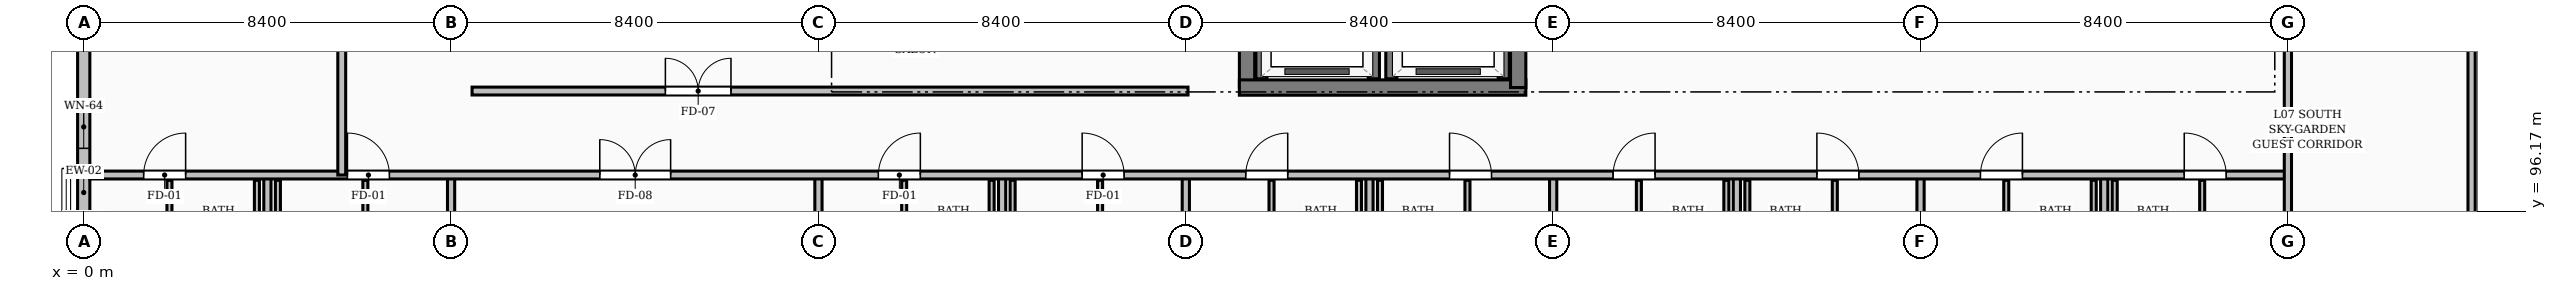
"""IFC4 building model, lengths in metres.
Left out: names, types, materials, properties, quantities, classifications, styles, units other than length and angle.
Written with IfcOpenShell. Run it as: python <this file> out.ifc"""

import sys

from ifc_helpers import new_model, si_unit, direction, frame, frame_2d, origin, place, context, subcontext, project, spatial, rectangle, extrude, element, fill, save


model = new_model("IFC4")
c1 = context("Model", 3, precision=1e-05, world=origin(), true_north=direction((0.0, 1.0)))
c2 = subcontext(c1, "Body", "Model", "MODEL_VIEW")
j1 = project(units=[si_unit("LENGTHUNIT", "METRE"), si_unit("PLANEANGLEUNIT", "RADIAN")], contexts=[c1])
p1 = place(None, origin())
s1 = spatial("IfcSite", under=j1, at=p1, CompositionType="ELEMENT")
p2 = place(p1, origin())
s2 = spatial("IfcBuilding", under=s1, at=p2, CompositionType="ELEMENT")
p3 = place(p2, frame((0.0, 0.0, 25.2)))
s3 = spatial("IfcBuildingStorey", under=s2, at=p3, CompositionType="ELEMENT", Elevation=25.2)
p4 = place(p3, frame((26.6, 99.0, 0.0), z_axis=(0.0, 0.0, 1.0), x_axis=(0.0, 1.0, 0.0)))
e1 = element("IfcWall", 1, at=p4, inside=s3, PredefinedType="SHEAR", context=c2, shape_type="SweptSolid", body=[
    extrude(rectangle(XDim=6.15, YDim=0.35, at=frame_2d((3.075, 0.0))), origin(), (0.0, 0.0, 1.0), 3.12),
])
p5 = place(p3, frame((26.425, 99.0, 0.0), z_axis=(0.0, 0.0, 1.0), x_axis=(1.0, 0.0, 0.0)))
e2 = element("IfcWall", 2, at=p5, inside=s3, PredefinedType="SHEAR", context=c2, shape_type="SweptSolid", body=[
    extrude(rectangle(XDim=6.55, YDim=0.35, at=frame_2d((3.275, 0.0))), origin(), (0.0, 0.0, 1.0), 3.12),
])
p6 = place(p3, frame((32.8, 99.0, 0.0), z_axis=(0.0, 0.0, 1.0), x_axis=(0.0, 1.0, 0.0)))
e3 = element("IfcWall", 3, at=p6, inside=s3, PredefinedType="SHEAR", context=c2, shape_type="SweptSolid", body=[
    extrude(rectangle(XDim=6.15, YDim=0.35, at=frame_2d((3.075, 0.0))), origin(), (0.0, 0.0, 1.0), 3.12),
])
p7 = place(p3, frame((0.0, 92.751, 0.0), z_axis=(0.0, 0.0, 1.0), x_axis=(0.0, 1.0, 0.0)))
e4 = element("IfcWall", 4, at=p7, inside=s3, PredefinedType="SOLIDWALL", context=c2, shape_type="SweptSolid", body=[
    extrude(rectangle(XDim=7.698, YDim=0.28, at=frame_2d((3.849, 0.0))), origin(), (0.0, 0.0, 1.0), 2.414),
])
p8 = place(p7, frame((2.309, 0.0, 0.3)))
e5 = element("IfcOpeningElement", 5, at=p8, cuts=e4, PredefinedType="OPENING", context=c2, shape_type="SweptSolid", body=[
    extrude(rectangle(XDim=0.98, YDim=1.75, at=frame_2d((0.49, 0.875))), frame((0.0, 0.15, 0.0), z_axis=(0.0, -1.0, 0.0), x_axis=(1.0, 0.0, 0.0)), (0.0, 0.0, 1.0), 0.3),
])
p9 = place(p7, frame((4.859, 0.0, 0.3)))
e6 = element("IfcOpeningElement", 6, at=p9, cuts=e4, PredefinedType="OPENING", context=c2, shape_type="SweptSolid", body=[
    extrude(rectangle(XDim=0.98, YDim=1.75, at=frame_2d((0.49, 0.875))), frame((0.0, 0.15, 0.0), z_axis=(0.0, -1.0, 0.0), x_axis=(1.0, 0.0, 0.0)), (0.0, 0.0, 1.0), 0.3),
])
for number, where, z_axis, x_axis in (
    (7, (26.93, 99.2, 0.0), (0.0, 0.0, 1.0), (0.0, 1.0, 0.0)),
    (8, (29.5, 99.2, 0.0), (0.0, 0.0, 1.0), (0.0, 1.0, 0.0)),
    (9, (29.9, 99.2, 0.0), (0.0, 0.0, 1.0), (0.0, 1.0, 0.0)),
    (10, (32.47, 99.2, 0.0), (0.0, 0.0, 1.0), (0.0, 1.0, 0.0)),
):
    element("IfcWall", number, at=place(p3, frame(where, z_axis=z_axis, x_axis=x_axis)), inside=s3, PredefinedType="SOLIDWALL", context=c2, shape_type="SweptSolid", body=[
        extrude(rectangle(XDim=2.2, YDim=0.255, at=frame_2d((1.1, 0.0))), origin(), (0.0, 0.0, 1.0), 3.12),
    ])
for number, where, z_axis, x_axis in (
    (11, (1.96, 94.73, 0.0), (0.0, 0.0, 1.0), (0.0, 1.0, 0.0)),
    (12, (3.96, 94.73, 0.0), (0.0, 0.0, 1.0), (0.0, 1.0, 0.0)),
    (13, (4.44, 94.73, 0.0), (0.0, 0.0, 1.0), (0.0, 1.0, 0.0)),
    (14, (6.44, 94.73, 0.0), (0.0, 0.0, 1.0), (0.0, 1.0, 0.0)),
):
    element("IfcWall", number, at=place(p3, frame(where, z_axis=z_axis, x_axis=x_axis)), inside=s3, PredefinedType="PARTITIONING", context=c2, shape_type="SweptSolid", body=[
        extrude(rectangle(XDim=2.15, YDim=0.115, at=frame_2d((1.075, 0.0))), origin(), (0.0, 0.0, 1.0), 3.12),
    ])
p10 = place(p3, frame((4.2, 92.54, 0.0), z_axis=(0.0, 0.0, 1.0), x_axis=(0.0, 1.0, 0.0)))
e15 = element("IfcWall", 15, at=p10, inside=s3, PredefinedType="PARTITIONING", context=c2, shape_type="SweptSolid", body=[
    extrude(rectangle(XDim=4.46, YDim=0.165, at=frame_2d((2.23, 0.0))), origin(), (0.0, 0.0, 1.0), 3.12),
])
p11 = place(p3, frame((8.4, 92.75, 0.0), z_axis=(0.0, 0.0, 1.0), x_axis=(0.0, 1.0, 0.0)))
e16 = element("IfcWall", 16, at=p11, inside=s3, PredefinedType="PARTITIONING", context=c2, shape_type="SweptSolid", body=[
    extrude(rectangle(XDim=4.25, YDim=0.165, at=frame_2d((2.125, 0.0))), origin(), (0.0, 0.0, 1.0), 2.375),
])
for number, where, z_axis, x_axis in (
    (17, (18.76, 94.73, 0.0), (0.0, 0.0, 1.0), (0.0, 1.0, 0.0)),
    (18, (20.76, 94.73, 0.0), (0.0, 0.0, 1.0), (0.0, 1.0, 0.0)),
    (19, (21.24, 94.73, 0.0), (0.0, 0.0, 1.0), (0.0, 1.0, 0.0)),
    (20, (23.24, 94.73, 0.0), (0.0, 0.0, 1.0), (0.0, 1.0, 0.0)),
):
    element("IfcWall", number, at=place(p3, frame(where, z_axis=z_axis, x_axis=x_axis)), inside=s3, PredefinedType="PARTITIONING", context=c2, shape_type="SweptSolid", body=[
        extrude(rectangle(XDim=2.15, YDim=0.115, at=frame_2d((1.075, 0.0))), origin(), (0.0, 0.0, 1.0), 3.12),
    ])
p12 = place(p3, frame((21.0, 92.562, 0.0), z_axis=(0.0, 0.0, 1.0), x_axis=(0.0, 1.0, 0.0)))
e21 = element("IfcWall", 21, at=p12, inside=s3, PredefinedType="PARTITIONING", context=c2, shape_type="SweptSolid", body=[
    extrude(rectangle(XDim=4.438, YDim=0.165, at=frame_2d((2.219, 0.0))), origin(), (0.0, 0.0, 1.0), 3.12),
])
p13 = place(p3, frame((16.8, 92.75, 0.0), z_axis=(0.0, 0.0, 1.0), x_axis=(0.0, 1.0, 0.0)))
e22 = element("IfcWall", 22, at=p13, inside=s3, PredefinedType="PARTITIONING", context=c2, shape_type="SweptSolid", body=[
    extrude(rectangle(XDim=4.25, YDim=0.165, at=frame_2d((2.125, 0.0))), origin(), (0.0, 0.0, 1.0), 2.455),
])
p14 = place(p3, frame((27.16, 94.73, 0.0), z_axis=(0.0, 0.0, 1.0), x_axis=(0.0, 1.0, 0.0)))
e23 = element("IfcWall", 23, at=p14, inside=s3, PredefinedType="PARTITIONING", context=c2, shape_type="SweptSolid", body=[
    extrude(rectangle(XDim=2.15, YDim=0.115, at=frame_2d((1.075, 0.0))), origin(), (0.0, 0.0, 1.0), 2.642),
])
for number, where, z_axis, x_axis in (
    (24, (29.16, 94.73, 0.0), (0.0, 0.0, 1.0), (0.0, 1.0, 0.0)),
    (25, (29.64, 94.73, 0.0), (0.0, 0.0, 1.0), (0.0, 1.0, 0.0)),
):
    element("IfcWall", number, at=place(p3, frame(where, z_axis=z_axis, x_axis=x_axis)), inside=s3, PredefinedType="PARTITIONING", context=c2, shape_type="SweptSolid", body=[
        extrude(rectangle(XDim=2.15, YDim=0.115, at=frame_2d((1.075, 0.0))), origin(), (0.0, 0.0, 1.0), 3.12),
    ])
p15 = place(p3, frame((31.64, 94.73, 0.0), z_axis=(0.0, 0.0, 1.0), x_axis=(0.0, 1.0, 0.0)))
e26 = element("IfcWall", 26, at=p15, inside=s3, PredefinedType="PARTITIONING", context=c2, shape_type="SweptSolid", body=[
    extrude(rectangle(XDim=2.15, YDim=0.115, at=frame_2d((1.075, 0.0))), origin(), (0.0, 0.0, 1.0), 2.642),
])
p16 = place(p3, frame((29.4, 92.575, 0.0), z_axis=(0.0, 0.0, 1.0), x_axis=(0.0, 1.0, 0.0)))
e27 = element("IfcWall", 27, at=p16, inside=s3, PredefinedType="PARTITIONING", context=c2, shape_type="SweptSolid", body=[
    extrude(rectangle(XDim=4.425, YDim=0.165, at=frame_2d((2.212, 0.0))), origin(), (0.0, 0.0, 1.0), 3.12),
])
p17 = place(p3, frame((25.2, 92.75, 0.0), z_axis=(0.0, 0.0, 1.0), x_axis=(0.0, 1.0, 0.0)))
e28 = element("IfcWall", 28, at=p17, inside=s3, PredefinedType="PARTITIONING", context=c2, shape_type="SweptSolid", body=[
    extrude(rectangle(XDim=4.25, YDim=0.165, at=frame_2d((2.125, 0.0))), origin(), (0.0, 0.0, 1.0), 2.455),
])
for number, where, z_axis, x_axis in (
    (29, (35.56, 94.73, 0.0), (0.0, 0.0, 1.0), (0.0, 1.0, 0.0)),
    (30, (37.56, 94.73, 0.0), (0.0, 0.0, 1.0), (0.0, 1.0, 0.0)),
    (31, (38.04, 94.73, 0.0), (0.0, 0.0, 1.0), (0.0, 1.0, 0.0)),
    (32, (40.04, 94.73, 0.0), (0.0, 0.0, 1.0), (0.0, 1.0, 0.0)),
):
    element("IfcWall", number, at=place(p3, frame(where, z_axis=z_axis, x_axis=x_axis)), inside=s3, PredefinedType="PARTITIONING", context=c2, shape_type="SweptSolid", body=[
        extrude(rectangle(XDim=2.15, YDim=0.115, at=frame_2d((1.075, 0.0))), origin(), (0.0, 0.0, 1.0), 3.12),
    ])
p18 = place(p3, frame((37.8, 92.59, 0.0), z_axis=(0.0, 0.0, 1.0), x_axis=(0.0, 1.0, 0.0)))
e33 = element("IfcWall", 33, at=p18, inside=s3, PredefinedType="PARTITIONING", context=c2, shape_type="SweptSolid", body=[
    extrude(rectangle(XDim=4.41, YDim=0.165, at=frame_2d((2.205, 0.0))), origin(), (0.0, 0.0, 1.0), 3.12),
])
p19 = place(p3, frame((33.6, 92.75, 0.0), z_axis=(0.0, 0.0, 1.0), x_axis=(0.0, 1.0, 0.0)))
e34 = element("IfcWall", 34, at=p19, inside=s3, PredefinedType="PARTITIONING", context=c2, shape_type="SweptSolid", body=[
    extrude(rectangle(XDim=4.25, YDim=0.165, at=frame_2d((2.125, 0.0))), origin(), (0.0, 0.0, 1.0), 2.455),
])
p20 = place(p3, frame((43.96, 94.73, 0.0), z_axis=(0.0, 0.0, 1.0), x_axis=(0.0, 1.0, 0.0)))
e35 = element("IfcWall", 35, at=p20, inside=s3, PredefinedType="PARTITIONING", context=c2, shape_type="SweptSolid", body=[
    extrude(rectangle(XDim=2.15, YDim=0.115, at=frame_2d((1.075, 0.0))), origin(), (0.0, 0.0, 1.0), 2.642),
])
for number, where, z_axis, x_axis in (
    (36, (45.96, 94.73, 0.0), (0.0, 0.0, 1.0), (0.0, 1.0, 0.0)),
    (37, (46.44, 94.73, 0.0), (0.0, 0.0, 1.0), (0.0, 1.0, 0.0)),
):
    element("IfcWall", number, at=place(p3, frame(where, z_axis=z_axis, x_axis=x_axis)), inside=s3, PredefinedType="PARTITIONING", context=c2, shape_type="SweptSolid", body=[
        extrude(rectangle(XDim=2.15, YDim=0.115, at=frame_2d((1.075, 0.0))), origin(), (0.0, 0.0, 1.0), 3.12),
    ])
p21 = place(p3, frame((48.44, 94.73, 0.0), z_axis=(0.0, 0.0, 1.0), x_axis=(0.0, 1.0, 0.0)))
e38 = element("IfcWall", 38, at=p21, inside=s3, PredefinedType="PARTITIONING", context=c2, shape_type="SweptSolid", body=[
    extrude(rectangle(XDim=2.15, YDim=0.115, at=frame_2d((1.075, 0.0))), origin(), (0.0, 0.0, 1.0), 2.642),
])
p22 = place(p3, frame((46.2, 92.613, 0.0), z_axis=(0.0, 0.0, 1.0), x_axis=(0.0, 1.0, 0.0)))
e39 = element("IfcWall", 39, at=p22, inside=s3, PredefinedType="PARTITIONING", context=c2, shape_type="SweptSolid", body=[
    extrude(rectangle(XDim=4.387, YDim=0.165, at=frame_2d((2.194, 0.0))), origin(), (0.0, 0.0, 1.0), 3.12),
])
p23 = place(p3, frame((42.0, 92.75, 0.0), z_axis=(0.0, 0.0, 1.0), x_axis=(0.0, 1.0, 0.0)))
e40 = element("IfcWall", 40, at=p23, inside=s3, PredefinedType="PARTITIONING", context=c2, shape_type="SweptSolid", body=[
    extrude(rectangle(XDim=4.25, YDim=0.165, at=frame_2d((2.125, 0.0))), origin(), (0.0, 0.0, 1.0), 2.455),
])
p24 = place(p3, frame((0.14, 97.0, 0.0), z_axis=(0.0, 0.0, 1.0), x_axis=(1.0, 0.0, 0.0)))
e41 = element("IfcWall", 41, at=p24, inside=s3, PredefinedType="PARTITIONING", context=c2, shape_type="SweptSolid", body=[
    extrude(rectangle(XDim=50.26, YDim=0.18, at=frame_2d((25.13, 0.0))), origin(), (0.0, 0.0, 1.0), 3.12),
])
p25 = place(p24, frame((1.23, 0.0, 0.0)))
e42 = element("IfcOpeningElement", 42, at=p25, cuts=e41, PredefinedType="OPENING", context=c2, shape_type="SweptSolid", body=[
    extrude(rectangle(XDim=0.96, YDim=2.15, at=frame_2d((0.48, 1.075))), frame((0.0, 0.1, 0.0), z_axis=(0.0, -1.0, 0.0), x_axis=(1.0, 0.0, 0.0)), (0.0, 0.0, 1.0), 0.2),
])
p26 = place(p24, frame((5.89, 0.0, 0.0)))
e43 = element("IfcOpeningElement", 43, at=p26, cuts=e41, PredefinedType="OPENING", context=c2, shape_type="SweptSolid", body=[
    extrude(rectangle(XDim=0.96, YDim=2.15, at=frame_2d((0.48, 1.075))), frame((0.0, 0.1, 0.0), z_axis=(0.0, -1.0, 0.0), x_axis=(1.0, 0.0, 0.0)), (0.0, 0.0, 1.0), 0.2),
])
p27 = place(p24, frame((11.66, 0.0, 0.0)))
e44 = element("IfcOpeningElement", 44, at=p27, cuts=e41, PredefinedType="OPENING", context=c2, shape_type="SweptSolid", body=[
    extrude(rectangle(XDim=1.62, YDim=2.2, at=frame_2d((0.81, 1.1))), frame((0.0, 0.1, 0.0), z_axis=(0.0, -1.0, 0.0), x_axis=(1.0, 0.0, 0.0)), (0.0, 0.0, 1.0), 0.2),
])
p28 = place(p24, frame((18.03, 0.0, 0.0)))
e45 = element("IfcOpeningElement", 45, at=p28, cuts=e41, PredefinedType="OPENING", context=c2, shape_type="SweptSolid", body=[
    extrude(rectangle(XDim=0.96, YDim=2.15, at=frame_2d((0.48, 1.075))), frame((0.0, 0.1, 0.0), z_axis=(0.0, -1.0, 0.0), x_axis=(1.0, 0.0, 0.0)), (0.0, 0.0, 1.0), 0.2),
])
p29 = place(p24, frame((22.69, 0.0, 0.0)))
e46 = element("IfcOpeningElement", 46, at=p29, cuts=e41, PredefinedType="OPENING", context=c2, shape_type="SweptSolid", body=[
    extrude(rectangle(XDim=0.96, YDim=2.15, at=frame_2d((0.48, 1.075))), frame((0.0, 0.1, 0.0), z_axis=(0.0, -1.0, 0.0), x_axis=(1.0, 0.0, 0.0)), (0.0, 0.0, 1.0), 0.2),
])
p30 = place(p24, frame((26.43, 0.0, 0.0)))
e47 = element("IfcOpeningElement", 47, at=p30, cuts=e41, PredefinedType="OPENING", context=c2, shape_type="SweptSolid", body=[
    extrude(rectangle(XDim=0.96, YDim=2.15, at=frame_2d((0.48, 1.075))), frame((0.0, 0.1, 0.0), z_axis=(0.0, -1.0, 0.0), x_axis=(1.0, 0.0, 0.0)), (0.0, 0.0, 1.0), 0.2),
])
p31 = place(p24, frame((31.09, 0.0, 0.0)))
e48 = element("IfcOpeningElement", 48, at=p31, cuts=e41, PredefinedType="OPENING", context=c2, shape_type="SweptSolid", body=[
    extrude(rectangle(XDim=0.96, YDim=2.15, at=frame_2d((0.48, 1.075))), frame((0.0, 0.1, 0.0), z_axis=(0.0, -1.0, 0.0), x_axis=(1.0, 0.0, 0.0)), (0.0, 0.0, 1.0), 0.2),
])
p32 = place(p24, frame((34.83, 0.0, 0.0)))
e49 = element("IfcOpeningElement", 49, at=p32, cuts=e41, PredefinedType="OPENING", context=c2, shape_type="SweptSolid", body=[
    extrude(rectangle(XDim=0.96, YDim=2.15, at=frame_2d((0.48, 1.075))), frame((0.0, 0.1, 0.0), z_axis=(0.0, -1.0, 0.0), x_axis=(1.0, 0.0, 0.0)), (0.0, 0.0, 1.0), 0.2),
])
p33 = place(p24, frame((39.49, 0.0, 0.0)))
e50 = element("IfcOpeningElement", 50, at=p33, cuts=e41, PredefinedType="OPENING", context=c2, shape_type="SweptSolid", body=[
    extrude(rectangle(XDim=0.96, YDim=2.15, at=frame_2d((0.48, 1.075))), frame((0.0, 0.1, 0.0), z_axis=(0.0, -1.0, 0.0), x_axis=(1.0, 0.0, 0.0)), (0.0, 0.0, 1.0), 0.2),
])
p34 = place(p24, frame((43.23, 0.0, 0.0)))
e51 = element("IfcOpeningElement", 51, at=p34, cuts=e41, PredefinedType="OPENING", context=c2, shape_type="SweptSolid", body=[
    extrude(rectangle(XDim=0.96, YDim=2.15, at=frame_2d((0.48, 1.075))), frame((0.0, 0.1, 0.0), z_axis=(0.0, -1.0, 0.0), x_axis=(1.0, 0.0, 0.0)), (0.0, 0.0, 1.0), 0.2),
])
p35 = place(p24, frame((47.89, 0.0, 0.0)))
e52 = element("IfcOpeningElement", 52, at=p35, cuts=e41, PredefinedType="OPENING", context=c2, shape_type="SweptSolid", body=[
    extrude(rectangle(XDim=0.96, YDim=2.15, at=frame_2d((0.48, 1.075))), frame((0.0, 0.1, 0.0), z_axis=(0.0, -1.0, 0.0), x_axis=(1.0, 0.0, 0.0)), (0.0, 0.0, 1.0), 0.2),
])
p36 = place(p3, frame((8.88, 98.92, 0.0), z_axis=(0.0, 0.0, 1.0), x_axis=(1.0, 0.0, 0.0)))
e53 = element("IfcWall", 53, at=p36, inside=s3, PredefinedType="PARTITIONING", context=c2, shape_type="SweptSolid", body=[
    extrude(rectangle(XDim=16.37, YDim=0.18, at=frame_2d((8.185, 0.0))), origin(), (0.0, 0.0, 1.0), 3.12),
])
p37 = place(p36, frame((4.42, 0.0, 0.0)))
e54 = element("IfcOpeningElement", 54, at=p37, cuts=e53, PredefinedType="OPENING", context=c2, shape_type="SweptSolid", body=[
    extrude(rectangle(XDim=1.5, YDim=2.2, at=frame_2d((0.75, 1.1))), frame((0.0, 0.1, 0.0), z_axis=(0.0, -1.0, 0.0), x_axis=(1.0, 0.0, 0.0)), (0.0, 0.0, 1.0), 0.2),
])
p38 = place(p3, frame((5.9, 97.0, 0.0), z_axis=(0.0, 0.0, 1.0), x_axis=(0.0, 1.0, 0.0)))
e55 = element("IfcWall", 55, at=p38, inside=s3, PredefinedType="PARTITIONING", context=c2, shape_type="SweptSolid", body=[
    extrude(rectangle(XDim=8.1, YDim=0.18, at=frame_2d((4.05, 0.0))), origin(), (0.0, 0.0, 1.0), 3.12),
])
p39 = place(p38, frame((4.18, 0.0, 0.0)))
e56 = element("IfcOpeningElement", 56, at=p39, cuts=e55, PredefinedType="OPENING", context=c2, shape_type="SweptSolid", body=[
    extrude(rectangle(XDim=1.1, YDim=2.1, at=frame_2d((0.55, 1.05))), frame((0.0, 0.1, 0.0), z_axis=(0.0, -1.0, 0.0), x_axis=(1.0, 0.0, 0.0)), (0.0, 0.0, 1.0), 0.2),
])
p40 = place(p3, frame((54.6, 92.625, 0.0), z_axis=(0.0, 0.0, 1.0), x_axis=(0.0, 1.0, 0.0)))
e57 = element("IfcWall", 57, at=p40, inside=s3, PredefinedType="PARTITIONING", context=c2, shape_type="SweptSolid", body=[
    extrude(rectangle(XDim=12.475, YDim=0.165, at=frame_2d((6.238, 0.0))), origin(), (0.0, 0.0, 1.0), 3.12),
])
p41 = place(p3, frame((50.4, 92.75, 0.0), z_axis=(0.0, 0.0, 1.0), x_axis=(0.0, 1.0, 0.0)))
e58 = element("IfcWall", 58, at=p41, inside=s3, PredefinedType="PARTITIONING", context=c2, shape_type="SweptSolid", body=[
    extrude(rectangle(XDim=12.35, YDim=0.165, at=frame_2d((6.175, 0.0))), origin(), (0.0, 0.0, 1.0), 2.455),
])
p42 = place(p9, origin())
e59 = element("IfcWindow", 59, at=p42, inside=s3, PartitioningType="SINGLE_PANEL", PredefinedType="WINDOW", context=c2, shape_type="SweptSolid", body=[
    extrude(rectangle(XDim=0.98, YDim=1.75, at=frame_2d((0.49, 0.875))), frame((0.0, 0.03, 0.0), z_axis=(0.0, -1.0, 0.0), x_axis=(1.0, 0.0, 0.0)), (0.0, 0.0, 1.0), 0.06),
])
fill(e6, e59)
p43 = place(p25, origin())
e60 = element("IfcDoor", 60, at=p43, inside=s3, OperationType="SINGLE_SWING_RIGHT", PredefinedType="DOOR", context=c2, shape_type="SweptSolid", body=[
    extrude(rectangle(XDim=0.96, YDim=2.15, at=frame_2d((0.48, 1.075))), frame((0.0, 0.025, 0.0), z_axis=(0.0, -1.0, 0.0), x_axis=(1.0, 0.0, 0.0)), (0.0, 0.0, 1.0), 0.05),
])
fill(e42, e60)
p44 = place(p26, origin())
e61 = element("IfcDoor", 61, at=p44, inside=s3, OperationType="SINGLE_SWING_LEFT", PredefinedType="DOOR", context=c2, shape_type="SweptSolid", body=[
    extrude(rectangle(XDim=0.96, YDim=2.15, at=frame_2d((0.48, 1.075))), frame((0.0, 0.025, 0.0), z_axis=(0.0, -1.0, 0.0), x_axis=(1.0, 0.0, 0.0)), (0.0, 0.0, 1.0), 0.05),
])
fill(e43, e61)
p45 = place(p27, origin())
e62 = element("IfcDoor", 62, at=p45, inside=s3, OperationType="DOUBLE_DOOR_SINGLE_SWING", PredefinedType="DOOR", context=c2, shape_type="SweptSolid", body=[
    extrude(rectangle(XDim=1.62, YDim=2.2, at=frame_2d((0.81, 1.1))), frame((0.0, 0.025, 0.0), z_axis=(0.0, -1.0, 0.0), x_axis=(1.0, 0.0, 0.0)), (0.0, 0.0, 1.0), 0.05),
])
fill(e44, e62)
p46 = place(p28, origin())
e63 = element("IfcDoor", 63, at=p46, inside=s3, OperationType="SINGLE_SWING_RIGHT", PredefinedType="DOOR", context=c2, shape_type="SweptSolid", body=[
    extrude(rectangle(XDim=0.96, YDim=2.15, at=frame_2d((0.48, 1.075))), frame((0.0, 0.025, 0.0), z_axis=(0.0, -1.0, 0.0), x_axis=(1.0, 0.0, 0.0)), (0.0, 0.0, 1.0), 0.05),
])
fill(e45, e63)
p47 = place(p29, origin())
e64 = element("IfcDoor", 64, at=p47, inside=s3, OperationType="SINGLE_SWING_LEFT", PredefinedType="DOOR", context=c2, shape_type="SweptSolid", body=[
    extrude(rectangle(XDim=0.96, YDim=2.15, at=frame_2d((0.48, 1.075))), frame((0.0, 0.025, 0.0), z_axis=(0.0, -1.0, 0.0), x_axis=(1.0, 0.0, 0.0)), (0.0, 0.0, 1.0), 0.05),
])
fill(e46, e64)
p48 = place(p30, origin())
e65 = element("IfcDoor", 65, at=p48, inside=s3, OperationType="SINGLE_SWING_RIGHT", PredefinedType="DOOR", context=c2, shape_type="SweptSolid", body=[
    extrude(rectangle(XDim=0.96, YDim=2.15, at=frame_2d((0.48, 1.075))), frame((0.0, 0.025, 0.0), z_axis=(0.0, -1.0, 0.0), x_axis=(1.0, 0.0, 0.0)), (0.0, 0.0, 1.0), 0.05),
])
fill(e47, e65)
p49 = place(p31, origin())
e66 = element("IfcDoor", 66, at=p49, inside=s3, OperationType="SINGLE_SWING_LEFT", PredefinedType="DOOR", context=c2, shape_type="SweptSolid", body=[
    extrude(rectangle(XDim=0.96, YDim=2.15, at=frame_2d((0.48, 1.075))), frame((0.0, 0.025, 0.0), z_axis=(0.0, -1.0, 0.0), x_axis=(1.0, 0.0, 0.0)), (0.0, 0.0, 1.0), 0.05),
])
fill(e48, e66)
p50 = place(p32, origin())
e67 = element("IfcDoor", 67, at=p50, inside=s3, OperationType="SINGLE_SWING_RIGHT", PredefinedType="DOOR", context=c2, shape_type="SweptSolid", body=[
    extrude(rectangle(XDim=0.96, YDim=2.15, at=frame_2d((0.48, 1.075))), frame((0.0, 0.025, 0.0), z_axis=(0.0, -1.0, 0.0), x_axis=(1.0, 0.0, 0.0)), (0.0, 0.0, 1.0), 0.05),
])
fill(e49, e67)
p51 = place(p33, origin())
e68 = element("IfcDoor", 68, at=p51, inside=s3, OperationType="SINGLE_SWING_LEFT", PredefinedType="DOOR", context=c2, shape_type="SweptSolid", body=[
    extrude(rectangle(XDim=0.96, YDim=2.15, at=frame_2d((0.48, 1.075))), frame((0.0, 0.025, 0.0), z_axis=(0.0, -1.0, 0.0), x_axis=(1.0, 0.0, 0.0)), (0.0, 0.0, 1.0), 0.05),
])
fill(e50, e68)
p52 = place(p34, origin())
e69 = element("IfcDoor", 69, at=p52, inside=s3, OperationType="SINGLE_SWING_RIGHT", PredefinedType="DOOR", context=c2, shape_type="SweptSolid", body=[
    extrude(rectangle(XDim=0.96, YDim=2.15, at=frame_2d((0.48, 1.075))), frame((0.0, 0.025, 0.0), z_axis=(0.0, -1.0, 0.0), x_axis=(1.0, 0.0, 0.0)), (0.0, 0.0, 1.0), 0.05),
])
fill(e51, e69)
p53 = place(p35, origin())
e70 = element("IfcDoor", 70, at=p53, inside=s3, OperationType="SINGLE_SWING_LEFT", PredefinedType="DOOR", context=c2, shape_type="SweptSolid", body=[
    extrude(rectangle(XDim=0.96, YDim=2.15, at=frame_2d((0.48, 1.075))), frame((0.0, 0.025, 0.0), z_axis=(0.0, -1.0, 0.0), x_axis=(1.0, 0.0, 0.0)), (0.0, 0.0, 1.0), 0.05),
])
fill(e52, e70)
p54 = place(p37, origin())
e71 = element("IfcDoor", 71, at=p54, inside=s3, OperationType="DOUBLE_DOOR_SINGLE_SWING", PredefinedType="DOOR", context=c2, shape_type="SweptSolid", body=[
    extrude(rectangle(XDim=1.5, YDim=2.2, at=frame_2d((0.75, 1.1))), frame((0.0, 0.025, 0.0), z_axis=(0.0, -1.0, 0.0), x_axis=(1.0, 0.0, 0.0)), (0.0, 0.0, 1.0), 0.05),
])
fill(e54, e71)
save(model, sys.argv[1])
